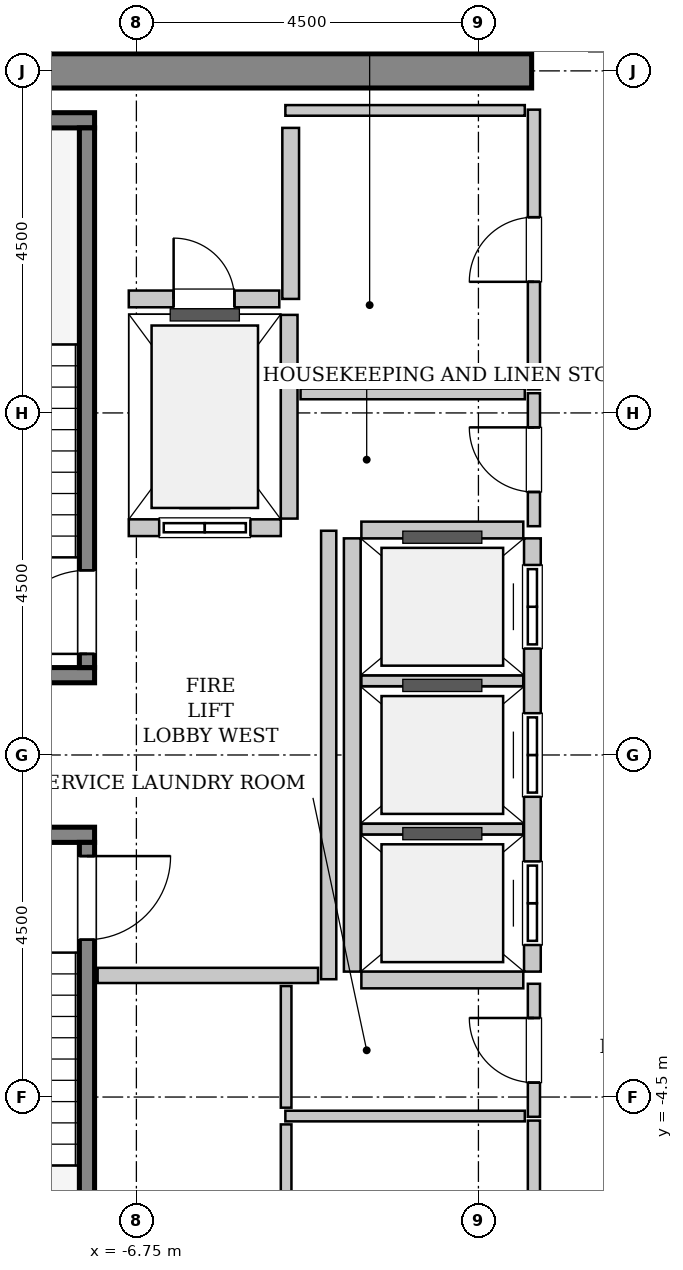
"""IFC4 building model, lengths in metres.
Left out: names, types, materials, properties, quantities, classifications, styles, units other than length and angle.
Written with IfcOpenShell. Run it as: python <this file> out.ifc"""

import sys

from ifc_helpers import new_model, si_unit, direction, frame, frame_2d, origin, place, context, subcontext, project, spatial, rectangle, extrude, source, transform, mapped, element, fill, save


model = new_model("IFC4")
c1 = context("Model", 3, precision=1e-05, world=origin(), true_north=direction((0.0, 1.0)))
c2 = subcontext(c1, "Body", "Model", "MODEL_VIEW")
j1 = project(units=[si_unit("LENGTHUNIT", "METRE"), si_unit("PLANEANGLEUNIT", "RADIAN")], contexts=[c1])
p1 = place(None, origin())
s1 = spatial("IfcSite", under=j1, at=p1, CompositionType="ELEMENT")
p2 = place(p1, origin())
s2 = spatial("IfcBuilding", under=s1, at=p2, CompositionType="ELEMENT")
p3 = place(p2, frame((0.0, 0.0, 283.6)))
s3 = spatial("IfcBuildingStorey", under=s2, at=p3, CompositionType="ELEMENT", Elevation=283.6)
m1 = source(origin(), c2, "Body", "SweptSolid", [
    extrude(rectangle(XDim=9.925, YDim=0.45, at=frame_2d((4.962, 0.0))), origin(), (0.0, 0.0, 1.0), 3.8),
])
p4 = place(p3, frame((-11.475, 9.0, 0.0), z_axis=(0.0, 0.0, 1.0), x_axis=(1.0, 0.0, 0.0)))
e1 = element("IfcWall", 1, at=p4, inside=s3, PredefinedType="SHEAR", context=c2, shape_type="MappedRepresentation", body=[
    mapped(m1, transform((0.0, 0.0, 0.0), x_axis=(1.0, 0.0, 0.0), y_axis=(0.0, 1.0, 0.0), z_axis=(0.0, 0.0, 1.0), scale=1.0)),
])
m2 = source(origin(), c2, "Body", "SweptSolid", [
    extrude(rectangle(XDim=3.4, YDim=0.2, at=frame_2d((1.7, 0.0))), origin(), (0.0, 0.0, 1.0), 3.8),
])
p5 = place(p3, frame((-7.3, 1.05, 0.0), z_axis=(0.0, 0.0, 1.0), x_axis=(-1.0, 0.0, 0.0)))
e2 = element("IfcWall", 2, at=p5, inside=s3, PredefinedType="SOLIDWALL", context=c2, shape_type="MappedRepresentation", body=[
    mapped(m2, transform((0.0, 0.0, 0.0), x_axis=(1.0, 0.0, 0.0), y_axis=(0.0, 1.0, 0.0), z_axis=(0.0, 0.0, 1.0), scale=1.0)),
])
m3 = source(origin(), c2, "Body", "SweptSolid", [
    extrude(rectangle(XDim=3.73, YDim=0.2, at=frame_2d((1.865, 0.0))), origin(), (0.0, 0.0, 1.0), 3.8),
])
p6 = place(p3, frame((-7.3, 8.35, 0.0), z_axis=(0.0, 0.0, 1.0), x_axis=(-1.0, 0.0, 0.0)))
e3 = element("IfcWall", 3, at=p6, inside=s3, PredefinedType="SOLIDWALL", context=c2, shape_type="MappedRepresentation", body=[
    mapped(m3, transform((0.0, 0.0, 0.0), x_axis=(1.0, 0.0, 0.0), y_axis=(0.0, 1.0, 0.0), z_axis=(0.0, 0.0, 1.0), scale=1.0)),
])
m4 = source(origin(), c2, "Body", "SweptSolid", [
    extrude(rectangle(XDim=7.1, YDim=0.2, at=frame_2d((3.55, 0.0))), origin(), (0.0, 0.0, 1.0), 3.8),
])
p7 = place(p3, frame((-7.4, 1.15, 0.0), z_axis=(0.0, 0.0, 1.0), x_axis=(0.0, 1.0, 0.0)))
e4 = element("IfcWall", 4, at=p7, inside=s3, PredefinedType="SOLIDWALL", context=c2, shape_type="MappedRepresentation", body=[
    mapped(m4, transform((0.0, 0.0, 0.0), x_axis=(1.0, 0.0, 0.0), y_axis=(0.0, 1.0, 0.0), z_axis=(0.0, 0.0, 1.0), scale=1.0)),
])
p8 = place(p7, frame((0.18, 0.0, 0.0)))
e5 = element("IfcOpeningElement", 5, at=p8, cuts=e4, PredefinedType="OPENING", context=c2, shape_type="SweptSolid", body=[
    extrude(rectangle(XDim=1.1, YDim=2.15, at=frame_2d((0.55, 1.075))), frame((0.0, 0.11, 0.0), z_axis=(0.0, -1.0, 0.0), x_axis=(1.0, 0.0, 0.0)), (0.0, 0.0, 1.0), 0.22),
])
p9 = place(p3, frame((-10.7, -1.05, 0.0), z_axis=(0.0, 0.0, 1.0), x_axis=(1.0, 0.0, 0.0)))
e6 = element("IfcWall", 6, at=p9, inside=s3, PredefinedType="SOLIDWALL", context=c2, shape_type="MappedRepresentation", body=[
    mapped(m2, transform((0.0, 0.0, 0.0), x_axis=(1.0, 0.0, 0.0), y_axis=(0.0, 1.0, 0.0), z_axis=(0.0, 0.0, 1.0), scale=1.0)),
])
p10 = place(p3, frame((-7.4, -1.15, 0.0), z_axis=(0.0, 0.0, 1.0), x_axis=(0.0, -1.0, 0.0)))
e7 = element("IfcWall", 7, at=p10, inside=s3, PredefinedType="SOLIDWALL", context=c2, shape_type="MappedRepresentation", body=[
    mapped(m4, transform((0.0, 0.0, 0.0), x_axis=(1.0, 0.0, 0.0), y_axis=(0.0, 1.0, 0.0), z_axis=(0.0, 0.0, 1.0), scale=1.0)),
])
p11 = place(p10, frame((0.18, 0.0, 0.0)))
e8 = element("IfcOpeningElement", 8, at=p11, cuts=e7, PredefinedType="OPENING", context=c2, shape_type="SweptSolid", body=[
    extrude(rectangle(XDim=1.1, YDim=2.15, at=frame_2d((0.55, 1.075))), frame((0.0, 0.11, 0.0), z_axis=(0.0, -1.0, 0.0), x_axis=(1.0, 0.0, 0.0)), (0.0, 0.0, 1.0), 0.22),
])
m5 = source(origin(), c2, "Body", "SweptSolid", [
    extrude(rectangle(XDim=2.0, YDim=0.22, at=frame_2d((1.0, 0.0))), origin(), (0.0, 0.0, 1.0), 3.535),
])
p12 = place(p3, frame((-6.85, 2.99, 0.0), z_axis=(0.0, 0.0, 1.0), x_axis=(1.0, 0.0, 0.0)))
e9 = element("IfcWall", 9, at=p12, inside=s3, PredefinedType="SOLIDWALL", context=c2, shape_type="MappedRepresentation", body=[
    mapped(m5, transform((0.0, 0.0, 0.0), x_axis=(1.0, 0.0, 0.0), y_axis=(0.0, 1.0, 0.0), z_axis=(0.0, 0.0, 1.0), scale=1.0)),
])
p13 = place(p12, frame((0.4, 0.0, 0.0)))
e10 = element("IfcOpeningElement", 10, at=p13, cuts=e9, PredefinedType="OPENING", context=c2, shape_type="SweptSolid", body=[
    extrude(rectangle(XDim=1.2, YDim=2.2, at=frame_2d((0.6, 1.1))), frame((0.0, 0.12, 0.0), z_axis=(0.0, -1.0, 0.0), x_axis=(1.0, 0.0, 0.0)), (0.0, 0.0, 1.0), 0.24),
])
m6 = source(origin(), c2, "Body", "SweptSolid", [
    extrude(rectangle(XDim=2.68, YDim=0.22, at=frame_2d((1.34, 0.0))), origin(), (0.0, 0.0, 1.0), 3.535),
])
p14 = place(p3, frame((-4.74, 3.11, 0.0), z_axis=(0.0, 0.0, 1.0), x_axis=(0.0, 1.0, 0.0)))
e11 = element("IfcWall", 11, at=p14, inside=s3, PredefinedType="SOLIDWALL", context=c2, shape_type="MappedRepresentation", body=[
    mapped(m6, transform((0.0, 0.0, 0.0), x_axis=(1.0, 0.0, 0.0), y_axis=(0.0, 1.0, 0.0), z_axis=(0.0, 0.0, 1.0), scale=1.0)),
])
m7 = source(origin(), c2, "Body", "SweptSolid", [
    extrude(rectangle(XDim=5.7, YDim=0.22, at=frame_2d((2.85, 0.0))), origin(), (0.0, 0.0, 1.0), 3.535),
])
p15 = place(p3, frame((-1.54, -2.85, 0.0), z_axis=(0.0, 0.0, 1.0), x_axis=(0.0, 1.0, 0.0)))
e12 = element("IfcWall", 12, at=p15, inside=s3, PredefinedType="SOLIDWALL", context=c2, shape_type="MappedRepresentation", body=[
    mapped(m7, transform((0.0, 0.0, 0.0), x_axis=(1.0, 0.0, 0.0), y_axis=(0.0, 1.0, 0.0), z_axis=(0.0, 0.0, 1.0), scale=1.0)),
])
p16 = place(p15, frame((0.35, 0.0, 0.0)))
e13 = element("IfcOpeningElement", 13, at=p16, cuts=e12, PredefinedType="OPENING", context=c2, shape_type="SweptSolid", body=[
    extrude(rectangle(XDim=1.1, YDim=2.2, at=frame_2d((0.55, 1.1))), frame((0.0, 0.12, 0.0), z_axis=(0.0, -1.0, 0.0), x_axis=(1.0, 0.0, 0.0)), (0.0, 0.0, 1.0), 0.24),
])
p17 = place(p15, frame((2.3, 0.0, 0.0)))
e14 = element("IfcOpeningElement", 14, at=p17, cuts=e12, PredefinedType="OPENING", context=c2, shape_type="SweptSolid", body=[
    extrude(rectangle(XDim=1.1, YDim=2.2, at=frame_2d((0.55, 1.1))), frame((0.0, 0.12, 0.0), z_axis=(0.0, -1.0, 0.0), x_axis=(1.0, 0.0, 0.0)), (0.0, 0.0, 1.0), 0.24),
])
p18 = place(p15, frame((4.25, 0.0, 0.0)))
e15 = element("IfcOpeningElement", 15, at=p18, cuts=e12, PredefinedType="OPENING", context=c2, shape_type="SweptSolid", body=[
    extrude(rectangle(XDim=1.1, YDim=2.2, at=frame_2d((0.55, 1.1))), frame((0.0, 0.12, 0.0), z_axis=(0.0, -1.0, 0.0), x_axis=(1.0, 0.0, 0.0)), (0.0, 0.0, 1.0), 0.24),
])
p19 = place(p3, frame((-3.91, 2.85, 0.0), z_axis=(0.0, 0.0, 1.0), x_axis=(0.0, -1.0, 0.0)))
e16 = element("IfcWall", 16, at=p19, inside=s3, PredefinedType="SOLIDWALL", context=c2, shape_type="MappedRepresentation", body=[
    mapped(m7, transform((0.0, 0.0, 0.0), x_axis=(1.0, 0.0, 0.0), y_axis=(0.0, 1.0, 0.0), z_axis=(0.0, 0.0, 1.0), scale=1.0)),
])
m8 = source(origin(), c2, "Body", "SweptSolid", [
    extrude(rectangle(XDim=2.13, YDim=0.22, at=frame_2d((1.065, 0.0))), origin(), (0.0, 0.0, 1.0), 3.535),
])
p20 = place(p3, frame((-3.79, -2.96, 0.0), z_axis=(0.0, 0.0, 1.0), x_axis=(1.0, 0.0, 0.0)))
e17 = element("IfcWall", 17, at=p20, inside=s3, PredefinedType="SOLIDWALL", context=c2, shape_type="MappedRepresentation", body=[
    mapped(m8, transform((0.0, 0.0, 0.0), x_axis=(1.0, 0.0, 0.0), y_axis=(0.0, 1.0, 0.0), z_axis=(0.0, 0.0, 1.0), scale=1.0)),
])
m9 = source(origin(), c2, "Body", "SweptSolid", [
    extrude(rectangle(XDim=2.13, YDim=0.14, at=frame_2d((1.065, 0.0))), origin(), (0.0, 0.0, 1.0), 3.535),
])
for number, where, z_axis, x_axis in (
    (18, (-3.79, -0.975, 0.0), (0.0, 0.0, 1.0), (1.0, 0.0, 0.0)),
    (19, (-3.79, 0.975, 0.0), (0.0, 0.0, 1.0), (1.0, 0.0, 0.0)),
):
    element("IfcWall", number, at=place(p3, frame(where, z_axis=z_axis, x_axis=x_axis)), inside=s3, PredefinedType="PARTITIONING", context=c2, shape_type="MappedRepresentation", body=[
        mapped(m9, transform((0.0, 0.0, 0.0), x_axis=(1.0, 0.0, 0.0), y_axis=(0.0, 1.0, 0.0), z_axis=(0.0, 0.0, 1.0), scale=1.0)),
    ])
p21 = place(p3, frame((-1.66, 2.96, 0.0), z_axis=(0.0, 0.0, 1.0), x_axis=(-1.0, 0.0, 0.0)))
e20 = element("IfcWall", 20, at=p21, inside=s3, PredefinedType="SOLIDWALL", context=c2, shape_type="MappedRepresentation", body=[
    mapped(m8, transform((0.0, 0.0, 0.0), x_axis=(1.0, 0.0, 0.0), y_axis=(0.0, 1.0, 0.0), z_axis=(0.0, 0.0, 1.0), scale=1.0)),
])
m10 = source(origin(), c2, "Body", "SweptSolid", [
    extrude(rectangle(XDim=2.25, YDim=0.22, at=frame_2d((1.125, 0.0))), origin(), (0.0, 0.0, 1.0), 3.535),
])
p22 = place(p3, frame((-4.72, 6.0, 0.0), z_axis=(0.0, 0.0, 1.0), x_axis=(0.0, 1.0, 0.0)))
e21 = element("IfcWall", 21, at=p22, inside=s3, PredefinedType="SOLIDWALL", context=c2, shape_type="MappedRepresentation", body=[
    mapped(m10, transform((0.0, 0.0, 0.0), x_axis=(1.0, 0.0, 0.0), y_axis=(0.0, 1.0, 0.0), z_axis=(0.0, 0.0, 1.0), scale=1.0)),
])
m11 = source(origin(), c2, "Body", "SweptSolid", [
    extrude(rectangle(XDim=1.98, YDim=0.22, at=frame_2d((0.99, 0.0))), origin(), (0.0, 0.0, 1.0), 3.535),
])
p23 = place(p3, frame((-6.85, 6.0, 0.0), z_axis=(0.0, 0.0, 1.0), x_axis=(1.0, 0.0, 0.0)))
e22 = element("IfcWall", 22, at=p23, inside=s3, PredefinedType="SOLIDWALL", context=c2, shape_type="MappedRepresentation", body=[
    mapped(m11, transform((0.0, 0.0, 0.0), x_axis=(1.0, 0.0, 0.0), y_axis=(0.0, 1.0, 0.0), z_axis=(0.0, 0.0, 1.0), scale=1.0)),
])
p24 = place(p23, frame((0.59, 0.0, 0.0)))
e23 = element("IfcOpeningElement", 23, at=p24, cuts=e22, PredefinedType="OPENING", context=c2, shape_type="SweptSolid", body=[
    extrude(rectangle(XDim=0.8, YDim=2.0, at=frame_2d((0.4, 1.0))), frame((0.0, 0.12, 0.0), z_axis=(0.0, -1.0, 0.0), x_axis=(1.0, 0.0, 0.0)), (0.0, 0.0, 1.0), 0.24),
])
m12 = source(origin(), c2, "Body", "SweptSolid", [
    extrude(rectangle(XDim=5.9, YDim=0.2, at=frame_2d((2.95, 0.0))), origin(), (0.0, 0.0, 1.0), 3.535),
])
p25 = place(p3, frame((-4.22, -2.95, 0.0), z_axis=(0.0, 0.0, 1.0), x_axis=(0.0, 1.0, 0.0)))
e24 = element("IfcWall", 24, at=p25, inside=s3, PredefinedType="PARTITIONING", context=c2, shape_type="MappedRepresentation", body=[
    mapped(m12, transform((0.0, 0.0, 0.0), x_axis=(1.0, 0.0, 0.0), y_axis=(0.0, 1.0, 0.0), z_axis=(0.0, 0.0, 1.0), scale=1.0)),
])
m13 = source(origin(), c2, "Body", "SweptSolid", [
    extrude(rectangle(XDim=2.9, YDim=0.2, at=frame_2d((1.45, 0.0))), origin(), (0.0, 0.0, 1.0), 3.535),
])
p26 = place(p3, frame((-7.26, -2.9, 0.0), z_axis=(0.0, 0.0, 1.0), x_axis=(1.0, 0.0, 0.0)))
e25 = element("IfcWall", 25, at=p26, inside=s3, PredefinedType="PARTITIONING", context=c2, shape_type="MappedRepresentation", body=[
    mapped(m13, transform((0.0, 0.0, 0.0), x_axis=(1.0, 0.0, 0.0), y_axis=(0.0, 1.0, 0.0), z_axis=(0.0, 0.0, 1.0), scale=1.0)),
])
m14 = source(origin(), c2, "Body", "SweptSolid", [
    extrude(rectangle(XDim=1.75, YDim=0.16, at=frame_2d((0.875, 0.0))), origin(), (0.0, 0.0, 1.0), 3.535),
])
p27 = place(p3, frame((-1.52, 3.01, 0.0), z_axis=(0.0, 0.0, 1.0), x_axis=(0.0, 1.0, 0.0)))
e26 = element("IfcWall", 26, at=p27, inside=s3, PredefinedType="PARTITIONING", context=c2, shape_type="MappedRepresentation", body=[
    mapped(m14, transform((0.0, 0.0, 0.0), x_axis=(1.0, 0.0, 0.0), y_axis=(0.0, 1.0, 0.0), z_axis=(0.0, 0.0, 1.0), scale=1.0)),
])
p28 = place(p27, frame((0.45, 0.0, 0.0)))
e27 = element("IfcOpeningElement", 27, at=p28, cuts=e26, PredefinedType="OPENING", context=c2, shape_type="SweptSolid", body=[
    extrude(rectangle(XDim=0.85, YDim=2.1, at=frame_2d((0.425, 1.05))), frame((0.0, 0.09, 0.0), z_axis=(0.0, -1.0, 0.0), x_axis=(1.0, 0.0, 0.0)), (0.0, 0.0, 1.0), 0.18),
])
m15 = source(origin(), c2, "Body", "SweptSolid", [
    extrude(rectangle(XDim=2.95, YDim=0.14, at=frame_2d((1.475, 0.0))), origin(), (0.0, 0.0, 1.0), 3.535),
])
p29 = place(p3, frame((-4.59, 4.75, 0.0), z_axis=(0.0, 0.0, 1.0), x_axis=(1.0, 0.0, 0.0)))
e28 = element("IfcWall", 28, at=p29, inside=s3, PredefinedType="PARTITIONING", context=c2, shape_type="MappedRepresentation", body=[
    mapped(m15, transform((0.0, 0.0, 0.0), x_axis=(1.0, 0.0, 0.0), y_axis=(0.0, 1.0, 0.0), z_axis=(0.0, 0.0, 1.0), scale=1.0)),
])
m16 = source(origin(), c2, "Body", "SweptSolid", [
    extrude(rectangle(XDim=3.68, YDim=0.16, at=frame_2d((1.84, 0.0))), origin(), (0.0, 0.0, 1.0), 3.535),
])
p30 = place(p3, frame((-1.52, 4.81, 0.0), z_axis=(0.0, 0.0, 1.0), x_axis=(0.0, 1.0, 0.0)))
e29 = element("IfcWall", 29, at=p30, inside=s3, PredefinedType="PARTITIONING", context=c2, shape_type="MappedRepresentation", body=[
    mapped(m16, transform((0.0, 0.0, 0.0), x_axis=(1.0, 0.0, 0.0), y_axis=(0.0, 1.0, 0.0), z_axis=(0.0, 0.0, 1.0), scale=1.0)),
])
p31 = place(p30, frame((1.415, 0.0, 0.0)))
e30 = element("IfcOpeningElement", 30, at=p31, cuts=e29, PredefinedType="OPENING", context=c2, shape_type="SweptSolid", body=[
    extrude(rectangle(XDim=0.85, YDim=2.1, at=frame_2d((0.425, 1.05))), frame((0.0, 0.09, 0.0), z_axis=(0.0, -1.0, 0.0), x_axis=(1.0, 0.0, 0.0)), (0.0, 0.0, 1.0), 0.18),
])
m17 = source(origin(), c2, "Body", "SweptSolid", [
    extrude(rectangle(XDim=3.15, YDim=0.14, at=frame_2d((1.575, 0.0))), origin(), (0.0, 0.0, 1.0), 3.535),
])
p32 = place(p3, frame((-4.79, 8.48, 0.0), z_axis=(0.0, 0.0, 1.0), x_axis=(1.0, 0.0, 0.0)))
e31 = element("IfcWall", 31, at=p32, inside=s3, PredefinedType="PARTITIONING", context=c2, shape_type="MappedRepresentation", body=[
    mapped(m17, transform((0.0, 0.0, 0.0), x_axis=(1.0, 0.0, 0.0), y_axis=(0.0, 1.0, 0.0), z_axis=(0.0, 0.0, 1.0), scale=1.0)),
])
p33 = place(p3, frame((-1.52, -4.76, 0.0), z_axis=(0.0, 0.0, 1.0), x_axis=(0.0, 1.0, 0.0)))
e32 = element("IfcWall", 32, at=p33, inside=s3, PredefinedType="PARTITIONING", context=c2, shape_type="MappedRepresentation", body=[
    mapped(m14, transform((0.0, 0.0, 0.0), x_axis=(1.0, 0.0, 0.0), y_axis=(0.0, 1.0, 0.0), z_axis=(0.0, 0.0, 1.0), scale=1.0)),
])
p34 = place(p33, frame((0.45, 0.0, 0.0)))
e33 = element("IfcOpeningElement", 33, at=p34, cuts=e32, PredefinedType="OPENING", context=c2, shape_type="SweptSolid", body=[
    extrude(rectangle(XDim=0.85, YDim=2.1, at=frame_2d((0.425, 1.05))), frame((0.0, 0.09, 0.0), z_axis=(0.0, -1.0, 0.0), x_axis=(1.0, 0.0, 0.0)), (0.0, 0.0, 1.0), 0.18),
])
p35 = place(p3, frame((-4.79, -4.75, 0.0), z_axis=(0.0, 0.0, 1.0), x_axis=(1.0, 0.0, 0.0)))
e34 = element("IfcWall", 34, at=p35, inside=s3, PredefinedType="PARTITIONING", context=c2, shape_type="MappedRepresentation", body=[
    mapped(m17, transform((0.0, 0.0, 0.0), x_axis=(1.0, 0.0, 0.0), y_axis=(0.0, 1.0, 0.0), z_axis=(0.0, 0.0, 1.0), scale=1.0)),
])
m18 = source(origin(), c2, "Body", "SweptSolid", [
    extrude(rectangle(XDim=1.6, YDim=0.14, at=frame_2d((0.8, 0.0))), origin(), (0.0, 0.0, 1.0), 3.535),
])
p36 = place(p3, frame((-4.78, -4.64, 0.0), z_axis=(0.0, 0.0, 1.0), x_axis=(0.0, 1.0, 0.0)))
e35 = element("IfcWall", 35, at=p36, inside=s3, PredefinedType="PARTITIONING", context=c2, shape_type="MappedRepresentation", body=[
    mapped(m18, transform((0.0, 0.0, 0.0), x_axis=(1.0, 0.0, 0.0), y_axis=(0.0, 1.0, 0.0), z_axis=(0.0, 0.0, 1.0), scale=1.0)),
])
p37 = place(p3, frame((-1.52, -8.49, 0.0), z_axis=(0.0, 0.0, 1.0), x_axis=(0.0, 1.0, 0.0)))
e36 = element("IfcWall", 36, at=p37, inside=s3, PredefinedType="PARTITIONING", context=c2, shape_type="MappedRepresentation", body=[
    mapped(m16, transform((0.0, 0.0, 0.0), x_axis=(1.0, 0.0, 0.0), y_axis=(0.0, 1.0, 0.0), z_axis=(0.0, 0.0, 1.0), scale=1.0)),
])
p38 = place(p37, frame((1.415, 0.0, 0.0)))
e37 = element("IfcOpeningElement", 37, at=p38, cuts=e36, PredefinedType="OPENING", context=c2, shape_type="SweptSolid", body=[
    extrude(rectangle(XDim=0.85, YDim=2.1, at=frame_2d((0.425, 1.05))), frame((0.0, 0.09, 0.0), z_axis=(0.0, -1.0, 0.0), x_axis=(1.0, 0.0, 0.0)), (0.0, 0.0, 1.0), 0.18),
])
m19 = source(origin(), c2, "Body", "SweptSolid", [
    extrude(rectangle(XDim=3.63, YDim=0.14, at=frame_2d((1.815, 0.0))), origin(), (0.0, 0.0, 1.0), 3.535),
])
p39 = place(p3, frame((-4.78, -8.49, 0.0), z_axis=(0.0, 0.0, 1.0), x_axis=(0.0, 1.0, 0.0)))
e38 = element("IfcWall", 38, at=p39, inside=s3, PredefinedType="PARTITIONING", context=c2, shape_type="MappedRepresentation", body=[
    mapped(m19, transform((0.0, 0.0, 0.0), x_axis=(1.0, 0.0, 0.0), y_axis=(0.0, 1.0, 0.0), z_axis=(0.0, 0.0, 1.0), scale=1.0)),
])
m20 = source(origin(), c2, "Body", "SweptSolid", [
    extrude(rectangle(XDim=1.1, YDim=2.15, at=frame_2d((0.55, 1.075))), frame((0.0, 0.025, 0.0), z_axis=(0.0, -1.0, 0.0), x_axis=(1.0, 0.0, 0.0)), (0.0, 0.0, 1.0), 0.05),
])
p40 = place(p8, origin())
e39 = element("IfcDoor", 39, at=p40, inside=s3, OperationType="SINGLE_SWING_LEFT", PredefinedType="DOOR", context=c2, shape_type="MappedRepresentation", body=[
    mapped(m20, transform((0.0, 0.0, 0.0), x_axis=(1.0, 0.0, 0.0), y_axis=(0.0, 1.0, 0.0), z_axis=(0.0, 0.0, 1.0), scale=1.0)),
])
fill(e5, e39)
p41 = place(p11, origin())
e40 = element("IfcDoor", 40, at=p41, inside=s3, OperationType="SINGLE_SWING_LEFT", PredefinedType="DOOR", context=c2, shape_type="MappedRepresentation", body=[
    mapped(m20, transform((0.0, 0.0, 0.0), x_axis=(1.0, 0.0, 0.0), y_axis=(0.0, 1.0, 0.0), z_axis=(0.0, 0.0, 1.0), scale=1.0)),
])
fill(e8, e40)
m21 = source(origin(), c2, "Body", "SweptSolid", [
    extrude(rectangle(XDim=1.2, YDim=2.2, at=frame_2d((0.6, 1.1))), frame((0.0, 0.025, 0.0), z_axis=(0.0, -1.0, 0.0), x_axis=(1.0, 0.0, 0.0)), (0.0, 0.0, 1.0), 0.05),
])
p42 = place(p13, origin())
e41 = element("IfcDoor", 41, at=p42, inside=s3, OperationType="SLIDING_TO_LEFT", PredefinedType="DOOR", context=c2, shape_type="MappedRepresentation", body=[
    mapped(m21, transform((0.0, 0.0, 0.0), x_axis=(1.0, 0.0, 0.0), y_axis=(0.0, 1.0, 0.0), z_axis=(0.0, 0.0, 1.0), scale=1.0)),
])
fill(e10, e41)
m22 = source(origin(), c2, "Body", "SweptSolid", [
    extrude(rectangle(XDim=1.1, YDim=2.2, at=frame_2d((0.55, 1.1))), frame((0.0, 0.025, 0.0), z_axis=(0.0, -1.0, 0.0), x_axis=(1.0, 0.0, 0.0)), (0.0, 0.0, 1.0), 0.05),
])
p43 = place(p16, origin())
e42 = element("IfcDoor", 42, at=p43, inside=s3, OperationType="DOUBLE_DOOR_SLIDING", PredefinedType="DOOR", context=c2, shape_type="MappedRepresentation", body=[
    mapped(m22, transform((0.0, 0.0, 0.0), x_axis=(1.0, 0.0, 0.0), y_axis=(0.0, 1.0, 0.0), z_axis=(0.0, 0.0, 1.0), scale=1.0)),
])
fill(e13, e42)
p44 = place(p17, origin())
e43 = element("IfcDoor", 43, at=p44, inside=s3, OperationType="DOUBLE_DOOR_SLIDING", PredefinedType="DOOR", context=c2, shape_type="MappedRepresentation", body=[
    mapped(m22, transform((0.0, 0.0, 0.0), x_axis=(1.0, 0.0, 0.0), y_axis=(0.0, 1.0, 0.0), z_axis=(0.0, 0.0, 1.0), scale=1.0)),
])
fill(e14, e43)
p45 = place(p18, origin())
e44 = element("IfcDoor", 44, at=p45, inside=s3, OperationType="DOUBLE_DOOR_SLIDING", PredefinedType="DOOR", context=c2, shape_type="MappedRepresentation", body=[
    mapped(m22, transform((0.0, 0.0, 0.0), x_axis=(1.0, 0.0, 0.0), y_axis=(0.0, 1.0, 0.0), z_axis=(0.0, 0.0, 1.0), scale=1.0)),
])
fill(e15, e44)
m23 = source(origin(), c2, "Body", "SweptSolid", [
    extrude(rectangle(XDim=0.8, YDim=2.0, at=frame_2d((0.4, 1.0))), frame((0.0, 0.025, 0.0), z_axis=(0.0, -1.0, 0.0), x_axis=(1.0, 0.0, 0.0)), (0.0, 0.0, 1.0), 0.05),
])
p46 = place(p24, origin())
e45 = element("IfcDoor", 45, at=p46, inside=s3, OperationType="SINGLE_SWING_LEFT", PredefinedType="TRAPDOOR", context=c2, shape_type="MappedRepresentation", body=[
    mapped(m23, transform((0.0, 0.0, 0.0), x_axis=(1.0, 0.0, 0.0), y_axis=(0.0, 1.0, 0.0), z_axis=(0.0, 0.0, 1.0), scale=1.0)),
])
fill(e23, e45)
m24 = source(origin(), c2, "Body", "SweptSolid", [
    extrude(rectangle(XDim=0.85, YDim=2.1, at=frame_2d((0.425, 1.05))), frame((0.0, 0.025, 0.0), z_axis=(0.0, -1.0, 0.0), x_axis=(1.0, 0.0, 0.0)), (0.0, 0.0, 1.0), 0.05),
])
p47 = place(p28, origin())
e46 = element("IfcDoor", 46, at=p47, inside=s3, OperationType="SINGLE_SWING_RIGHT", PredefinedType="DOOR", context=c2, shape_type="MappedRepresentation", body=[
    mapped(m24, transform((0.0, 0.0, 0.0), x_axis=(1.0, 0.0, 0.0), y_axis=(0.0, 1.0, 0.0), z_axis=(0.0, 0.0, 1.0), scale=1.0)),
])
fill(e27, e46)
p48 = place(p31, origin())
e47 = element("IfcDoor", 47, at=p48, inside=s3, OperationType="SINGLE_SWING_LEFT", PredefinedType="DOOR", context=c2, shape_type="MappedRepresentation", body=[
    mapped(m24, transform((0.0, 0.0, 0.0), x_axis=(1.0, 0.0, 0.0), y_axis=(0.0, 1.0, 0.0), z_axis=(0.0, 0.0, 1.0), scale=1.0)),
])
fill(e30, e47)
p49 = place(p34, origin())
e48 = element("IfcDoor", 48, at=p49, inside=s3, OperationType="SINGLE_SWING_RIGHT", PredefinedType="DOOR", context=c2, shape_type="MappedRepresentation", body=[
    mapped(m24, transform((0.0, 0.0, 0.0), x_axis=(1.0, 0.0, 0.0), y_axis=(0.0, 1.0, 0.0), z_axis=(0.0, 0.0, 1.0), scale=1.0)),
])
fill(e33, e48)
save(model, sys.argv[1])
